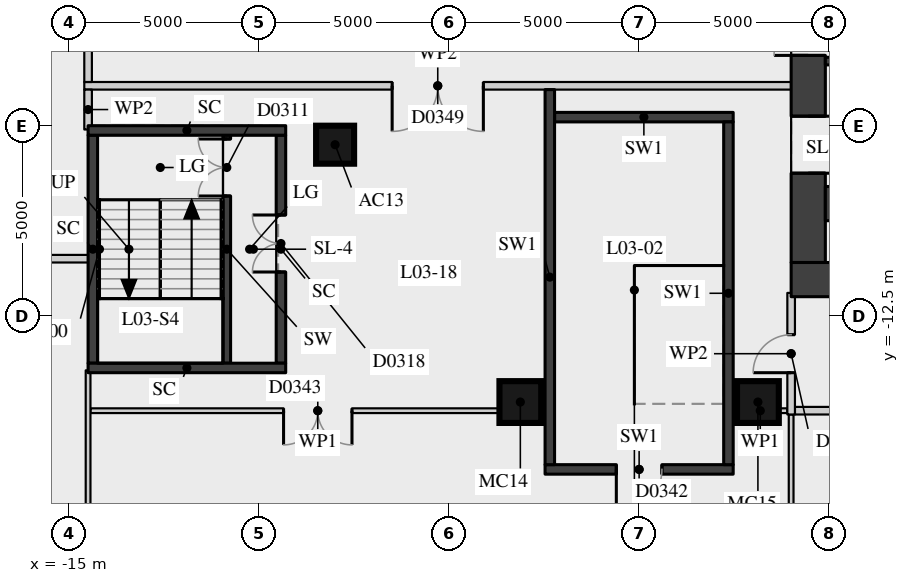
"""IFC4 building model, lengths in metres.
Left out: names, types, materials, properties, quantities, classifications, styles, units other than length and angle.
Written with IfcOpenShell. Run it as: python <this file> out.ifc"""

import sys

from ifc_helpers import new_model, si_unit, direction, frame, frame_2d, origin, origin_2d, place, context, subcontext, project, spatial, rectangle, extrude, element, fill, save


model = new_model("IFC4")
c1 = context("Model", 3, precision=1e-05, world=origin(), true_north=direction((0.0, 1.0)))
c2 = subcontext(c1, "Body", "Model", "MODEL_VIEW")
j1 = project(units=[si_unit("LENGTHUNIT", "METRE"), si_unit("PLANEANGLEUNIT", "RADIAN")], contexts=[c1])
p1 = place(None, origin())
s1 = spatial("IfcSite", under=j1, at=p1, CompositionType="ELEMENT")
p2 = place(p1, origin())
s2 = spatial("IfcBuilding", under=s1, at=p2, CompositionType="ELEMENT")
p3 = place(p2, frame((0.0, 0.0, 17.5)))
s3 = spatial("IfcBuildingStorey", under=s2, at=p3, CompositionType="ELEMENT", Elevation=17.5)
p4 = place(p3, frame((-8.0, -8.0, 0.0), z_axis=(0.0, 0.0, 1.0), x_axis=(1.0, 0.0, 0.0)))
e1 = element("IfcColumn", 1, at=p4, inside=s3, PredefinedType="COLUMN", context=c2, shape_type="SweptSolid", body=[
    extrude(rectangle(XDim=1.0, YDim=1.0, at=origin_2d()), origin(), (0.0, 0.0, 1.0), 4.2),
])
for number, where, z_axis, x_axis in (
    (2, (-3.126, -14.772, 0.0), (0.0, 0.0, 1.0), (1.0, 0.0, 0.0)),
    (3, (3.126, -14.772, 0.0), (0.0, 0.0, 1.0), (1.0, 0.0, 0.0)),
):
    element("IfcColumn", number, at=place(p3, frame(where, z_axis=z_axis, x_axis=x_axis)), inside=s3, PredefinedType="COLUMN", context=c2, shape_type="SweptSolid", body=[
        extrude(rectangle(XDim=1.1, YDim=1.1, at=origin_2d()), origin(), (0.0, 0.0, 1.0), 4.2),
    ])
p5 = place(p3, frame((4.45, -11.1, 0.0), z_axis=(0.0, 0.0, 1.0), x_axis=(0.0, 1.0, 0.0)))
e4 = element("IfcWall", 4, at=p5, inside=s3, PredefinedType="SHEAR", context=c2, shape_type="SweptSolid", body=[
    extrude(rectangle(XDim=22.2, YDim=0.9, at=frame_2d((11.1, 0.0))), origin(), (0.0, 0.0, 1.0), 3.92),
])
p6 = place(p5, frame((2.35, 0.0, 0.0)))
e5 = element("IfcOpeningElement", 5, at=p6, cuts=e4, PredefinedType="OPENING", context=c2, shape_type="SweptSolid", body=[
    extrude(rectangle(XDim=1.5, YDim=2.1, at=frame_2d((0.75, 1.05))), frame((0.0, 0.46, 0.0), z_axis=(0.0, -1.0, 0.0), x_axis=(1.0, 0.0, 0.0)), (0.0, 0.0, 1.0), 0.92),
])
p7 = place(p5, frame((5.45, 0.0, 0.0)))
e6 = element("IfcOpeningElement", 6, at=p7, cuts=e4, PredefinedType="OPENING", context=c2, shape_type="SweptSolid", body=[
    extrude(rectangle(XDim=1.8, YDim=2.1, at=frame_2d((0.9, 1.05))), frame((0.0, 0.46, 0.0), z_axis=(0.0, -1.0, 0.0), x_axis=(1.0, 0.0, 0.0)), (0.0, 0.0, 1.0), 0.92),
])
p8 = place(p5, frame((7.95, 0.0, 0.0)))
e7 = element("IfcOpeningElement", 7, at=p8, cuts=e4, PredefinedType="OPENING", context=c2, shape_type="SweptSolid", body=[
    extrude(rectangle(XDim=1.1, YDim=2.1, at=frame_2d((0.55, 1.05))), frame((0.0, 0.46, 0.0), z_axis=(0.0, -1.0, 0.0), x_axis=(1.0, 0.0, 0.0)), (0.0, 0.0, 1.0), 0.92),
])
p9 = place(p5, frame((10.6, 0.0, 0.0)))
e8 = element("IfcOpeningElement", 8, at=p9, cuts=e4, PredefinedType="OPENING", context=c2, shape_type="SweptSolid", body=[
    extrude(rectangle(XDim=1.0, YDim=2.1, at=frame_2d((0.5, 1.05))), frame((0.0, 0.46, 0.0), z_axis=(0.0, -1.0, 0.0), x_axis=(1.0, 0.0, 0.0)), (0.0, 0.0, 1.0), 0.92),
])
p10 = place(p5, frame((13.15, 0.0, 0.0)))
e9 = element("IfcOpeningElement", 9, at=p10, cuts=e4, PredefinedType="OPENING", context=c2, shape_type="SweptSolid", body=[
    extrude(rectangle(XDim=1.1, YDim=2.1, at=frame_2d((0.55, 1.05))), frame((0.0, 0.46, 0.0), z_axis=(0.0, -1.0, 0.0), x_axis=(1.0, 0.0, 0.0)), (0.0, 0.0, 1.0), 0.92),
])
p11 = place(p5, frame((14.95, 0.0, 0.0)))
e10 = element("IfcOpeningElement", 10, at=p11, cuts=e4, PredefinedType="OPENING", context=c2, shape_type="SweptSolid", body=[
    extrude(rectangle(XDim=1.8, YDim=2.1, at=frame_2d((0.9, 1.05))), frame((0.0, 0.46, 0.0), z_axis=(0.0, -1.0, 0.0), x_axis=(1.0, 0.0, 0.0)), (0.0, 0.0, 1.0), 0.92),
])
p12 = place(p5, frame((18.35, 0.0, 0.0)))
e11 = element("IfcOpeningElement", 11, at=p12, cuts=e4, PredefinedType="OPENING", context=c2, shape_type="SweptSolid", body=[
    extrude(rectangle(XDim=1.5, YDim=2.1, at=frame_2d((0.75, 1.05))), frame((0.0, 0.46, 0.0), z_axis=(0.0, -1.0, 0.0), x_axis=(1.0, 0.0, 0.0)), (0.0, 0.0, 1.0), 0.92),
])
p13 = place(p3, frame((4.0, -11.55, 0.0), z_axis=(0.0, 0.0, 1.0), x_axis=(1.0, 0.0, 0.0)))
e12 = element("IfcWall", 12, at=p13, inside=s3, PredefinedType="SHEAR", context=c2, shape_type="SweptSolid", body=[
    extrude(rectangle(XDim=15.2, YDim=0.9, at=frame_2d((7.6, 0.0))), origin(), (0.0, 0.0, 1.0), 3.92),
])
p14 = place(p3, frame((4.9, -9.55, 0.0), z_axis=(0.0, 0.0, 1.0), x_axis=(1.0, 0.0, 0.0)))
e13 = element("IfcWall", 13, at=p14, inside=s3, PredefinedType="SHEAR", context=c2, shape_type="SweptSolid", body=[
    extrude(rectangle(XDim=10.2, YDim=0.9, at=frame_2d((5.1, 0.0))), origin(), (0.0, 0.0, 1.0), 3.92),
])
p15 = place(p3, frame((4.9, -5.8, 0.0), z_axis=(0.0, 0.0, 1.0), x_axis=(1.0, 0.0, 0.0)))
e14 = element("IfcWall", 14, at=p15, inside=s3, PredefinedType="SHEAR", context=c2, shape_type="SweptSolid", body=[
    extrude(rectangle(XDim=10.2, YDim=0.2, at=frame_2d((5.1, 0.0))), origin(), (0.0, 0.0, 1.0), 3.92),
])
p16 = place(p3, frame((-10.85, -13.75, 0.0), z_axis=(0.0, 0.0, 1.0), x_axis=(0.0, 1.0, 0.0)))
e15 = element("IfcWall", 15, at=p16, inside=s3, PredefinedType="SHEAR", context=c2, shape_type="SweptSolid", body=[
    extrude(rectangle(XDim=6.0, YDim=0.2, at=frame_2d((3.0, 0.0))), origin(), (0.0, 0.0, 1.0), 3.92),
])
p17 = place(p16, frame((4.4, 0.0, 0.0)))
e16 = element("IfcOpeningElement", 16, at=p17, cuts=e15, PredefinedType="OPENING", context=c2, shape_type="SweptSolid", body=[
    extrude(rectangle(XDim=1.5, YDim=2.1, at=frame_2d((0.75, 1.05))), frame((0.0, 0.11, 0.0), z_axis=(0.0, -1.0, 0.0), x_axis=(1.0, 0.0, 0.0)), (0.0, 0.0, 1.0), 0.22),
])
p18 = place(p3, frame((-14.375, -13.75, -0.35), z_axis=(0.0, 0.0, 1.0), x_axis=(0.0, 1.0, 0.0)))
e17 = element("IfcWall", 17, at=p18, inside=s3, PredefinedType="SHEAR", context=c2, shape_type="SweptSolid", body=[
    extrude(rectangle(XDim=6.0, YDim=0.25, at=frame_2d((3.0, 0.0))), origin(), (0.0, 0.0, 1.0), 4.27),
])
p19 = place(p3, frame((-9.425, -13.75, -0.35), z_axis=(0.0, 0.0, 1.0), x_axis=(0.0, 1.0, 0.0)))
e18 = element("IfcWall", 18, at=p19, inside=s3, PredefinedType="SHEAR", context=c2, shape_type="SweptSolid", body=[
    extrude(rectangle(XDim=6.0, YDim=0.25, at=frame_2d((3.0, 0.0))), origin(), (0.0, 0.0, 1.0), 4.27),
])
p20 = place(p19, frame((2.4, 0.0, 0.35)))
e19 = element("IfcOpeningElement", 19, at=p20, cuts=e18, PredefinedType="OPENING", context=c2, shape_type="SweptSolid", body=[
    extrude(rectangle(XDim=1.5, YDim=2.1, at=frame_2d((0.75, 1.05))), frame((0.0, 0.135, 0.0), z_axis=(0.0, -1.0, 0.0), x_axis=(1.0, 0.0, 0.0)), (0.0, 0.0, 1.0), 0.27),
])
for number, where, z_axis, x_axis in (
    (20, (-14.5, -7.625, -0.35), (0.0, 0.0, 1.0), (1.0, 0.0, 0.0)),
    (21, (-14.5, -13.875, -0.35), (0.0, 0.0, 1.0), (1.0, 0.0, 0.0)),
):
    element("IfcWall", number, at=place(p3, frame(where, z_axis=z_axis, x_axis=x_axis)), inside=s3, PredefinedType="SHEAR", context=c2, shape_type="SweptSolid", body=[
        extrude(rectangle(XDim=5.2, YDim=0.25, at=frame_2d((2.6, 0.0))), origin(), (0.0, 0.0, 1.0), 4.27),
    ])
p21 = place(p3, frame((-2.475, -16.545, 0.0), z_axis=(0.0, 0.0, 1.0), x_axis=(1.0, 0.0, 0.0)))
e22 = element("IfcWall", 22, at=p21, inside=s3, PredefinedType="SOLIDWALL", context=c2, shape_type="SweptSolid", body=[
    extrude(rectangle(XDim=4.95, YDim=0.25, at=frame_2d((2.475, 0.0))), origin(), (0.0, 0.0, 1.0), 3.92),
])
p22 = place(p21, frame((1.875, 0.0, 0.0)))
e23 = element("IfcOpeningElement", 23, at=p22, cuts=e22, PredefinedType="OPENING", context=c2, shape_type="SweptSolid", body=[
    extrude(rectangle(XDim=1.2, YDim=2.1, at=frame_2d((0.6, 1.05))), frame((0.0, 0.135, 0.0), z_axis=(0.0, -1.0, 0.0), x_axis=(1.0, 0.0, 0.0)), (0.0, 0.0, 1.0), 0.27),
])
p23 = place(p3, frame((-14.438, -15.0, 0.0), z_axis=(0.0, 0.0, 1.0), x_axis=(1.0, 0.0, 0.0)))
e24 = element("IfcWall", 24, at=p23, inside=s3, PredefinedType="PARTITIONING", context=c2, shape_type="SweptSolid", body=[
    extrude(rectangle(XDim=11.962, YDim=0.125, at=frame_2d((5.981, 0.0))), origin(), (0.0, 0.0, 1.0), 3.92),
])
p24 = place(p23, frame((5.082, 0.0, 0.0)))
e25 = element("IfcOpeningElement", 25, at=p24, cuts=e24, PredefinedType="OPENING", context=c2, shape_type="SweptSolid", body=[
    extrude(rectangle(XDim=1.8, YDim=2.1, at=frame_2d((0.9, 1.05))), frame((0.0, 0.073, 0.0), z_axis=(0.0, -1.0, 0.0), x_axis=(1.0, 0.0, 0.0)), (0.0, 0.0, 1.0), 0.145),
])
p25 = place(p3, frame((2.475, -15.0, 0.0), z_axis=(0.0, 0.0, 1.0), x_axis=(1.0, 0.0, 0.0)))
e26 = element("IfcWall", 26, at=p25, inside=s3, PredefinedType="PARTITIONING", context=c2, shape_type="SweptSolid", body=[
    extrude(rectangle(XDim=1.425, YDim=0.125, at=frame_2d((0.712, 0.0))), origin(), (0.0, 0.0, 1.0), 3.92),
])
p26 = place(p3, frame((4.1, -15.0, 0.0), z_axis=(0.0, 0.0, 1.0), x_axis=(1.0, 0.0, 0.0)))
e27 = element("IfcWall", 27, at=p26, inside=s3, PredefinedType="PARTITIONING", context=c2, shape_type="SweptSolid", body=[
    extrude(rectangle(XDim=18.962, YDim=0.2, at=frame_2d((9.481, 0.0))), origin(), (0.0, 0.0, 1.0), 3.92),
])
p27 = place(p26, frame((3.5, 0.0, 0.0)))
e28 = element("IfcOpeningElement", 28, at=p27, cuts=e27, PredefinedType="OPENING", context=c2, shape_type="SweptSolid", body=[
    extrude(rectangle(XDim=1.0, YDim=2.1, at=frame_2d((0.5, 1.05))), frame((0.0, 0.11, 0.0), z_axis=(0.0, -1.0, 0.0), x_axis=(1.0, 0.0, 0.0)), (0.0, 0.0, 1.0), 0.22),
])
p28 = place(p26, frame((10.0, 0.0, 0.0)))
e29 = element("IfcOpeningElement", 29, at=p28, cuts=e27, PredefinedType="OPENING", context=c2, shape_type="SweptSolid", body=[
    extrude(rectangle(XDim=1.0, YDim=2.1, at=frame_2d((0.5, 1.05))), frame((0.0, 0.11, 0.0), z_axis=(0.0, -1.0, 0.0), x_axis=(1.0, 0.0, 0.0)), (0.0, 0.0, 1.0), 0.22),
])
p29 = place(p3, frame((-25.702, -11.0, 0.0), z_axis=(0.0, 0.0, 1.0), x_axis=(1.0, 0.0, 0.0)))
e30 = element("IfcWall", 30, at=p29, inside=s3, PredefinedType="PARTITIONING", context=c2, shape_type="SweptSolid", body=[
    extrude(rectangle(XDim=11.204, YDim=0.2, at=frame_2d((5.602, 0.0))), origin(), (0.0, 0.0, 1.0), 3.92),
])
p30 = place(p29, frame((5.102, 0.0, 0.0)))
e31 = element("IfcOpeningElement", 31, at=p30, cuts=e30, PredefinedType="OPENING", context=c2, shape_type="SweptSolid", body=[
    extrude(rectangle(XDim=1.0, YDim=2.1, at=frame_2d((0.5, 1.05))), frame((0.0, 0.11, 0.0), z_axis=(0.0, -1.0, 0.0), x_axis=(1.0, 0.0, 0.0)), (0.0, 0.0, 1.0), 0.22),
])
p31 = place(p3, frame((-2.225, -7.275, 0.0), z_axis=(0.0, 0.0, 1.0), x_axis=(1.0, 0.0, 0.0)))
e32 = element("IfcWall", 32, at=p31, inside=s3, PredefinedType="SOLIDWALL", context=c2, shape_type="SweptSolid", body=[
    extrude(rectangle(XDim=4.7, YDim=0.25, at=frame_2d((2.35, 0.0))), origin(), (0.0, 0.0, 1.0), 3.92),
])
p32 = place(p3, frame((-14.6, -6.45, 0.0), z_axis=(0.0, 0.0, 1.0), x_axis=(1.0, 0.0, 0.0)))
e33 = element("IfcWall", 33, at=p32, inside=s3, PredefinedType="PARTITIONING", context=c2, shape_type="SweptSolid", body=[
    extrude(rectangle(XDim=18.602, YDim=0.2, at=frame_2d((9.301, 0.0))), origin(), (0.0, 0.0, 1.0), 3.92),
])
p33 = place(p32, frame((8.101, 0.0, 0.0)))
e34 = element("IfcOpeningElement", 34, at=p33, cuts=e33, PredefinedType="OPENING", context=c2, shape_type="SweptSolid", body=[
    extrude(rectangle(XDim=2.4, YDim=2.4, at=frame_2d((1.2, 1.2))), frame((0.0, 0.11, 0.0), z_axis=(0.0, -1.0, 0.0), x_axis=(1.0, 0.0, 0.0)), (0.0, 0.0, 1.0), 0.22),
])
p34 = place(p3, frame((-14.5, -22.027, 0.0), z_axis=(0.0, 0.0, 1.0), x_axis=(0.0, 1.0, 0.0)))
e35 = element("IfcWall", 35, at=p34, inside=s3, PredefinedType="PARTITIONING", context=c2, shape_type="SweptSolid", body=[
    extrude(rectangle(XDim=8.089, YDim=0.125, at=frame_2d((4.045, 0.0))), origin(), (0.0, 0.0, 1.0), 3.47),
])
p35 = place(p34, frame((3.045, 0.0, 0.0)))
e36 = element("IfcOpeningElement", 36, at=p35, cuts=e35, PredefinedType="OPENING", context=c2, shape_type="SweptSolid", body=[
    extrude(rectangle(XDim=1.0, YDim=2.1, at=frame_2d((0.5, 1.05))), frame((0.0, 0.073, 0.0), z_axis=(0.0, -1.0, 0.0), x_axis=(1.0, 0.0, 0.0)), (0.0, 0.0, 1.0), 0.145),
])
p36 = place(p3, frame((-14.5, -7.6, 0.0), z_axis=(0.0, 0.0, 1.0), x_axis=(0.0, 1.0, 0.0)))
e37 = element("IfcWall", 37, at=p36, inside=s3, PredefinedType="PARTITIONING", context=c2, shape_type="SweptSolid", body=[
    extrude(rectangle(XDim=1.05, YDim=0.2, at=frame_2d((0.525, 0.0))), origin(), (0.0, 0.0, 1.0), 3.92),
])
p37 = place(p3, frame((-14.5, -6.35, 0.0), z_axis=(0.0, 0.0, 1.0), x_axis=(0.0, 1.0, 0.0)))
e38 = element("IfcWall", 38, at=p37, inside=s3, PredefinedType="PARTITIONING", context=c2, shape_type="SweptSolid", body=[
    extrude(rectangle(XDim=13.95, YDim=0.2, at=frame_2d((6.975, 0.0))), origin(), (0.0, 0.0, 1.0), 3.92),
])
p38 = place(p37, frame((10.025, 0.0, 0.0)))
e39 = element("IfcOpeningElement", 39, at=p38, cuts=e38, PredefinedType="OPENING", context=c2, shape_type="SweptSolid", body=[
    extrude(rectangle(XDim=2.4, YDim=2.4, at=frame_2d((1.2, 1.2))), frame((0.0, 0.11, 0.0), z_axis=(0.0, -1.0, 0.0), x_axis=(1.0, 0.0, 0.0)), (0.0, 0.0, 1.0), 0.22),
])
p39 = place(p3, frame((-2.35, -16.42, 0.0), z_axis=(0.0, 0.0, 1.0), x_axis=(0.0, 1.0, 0.0)))
e40 = element("IfcWall", 40, at=p39, inside=s3, PredefinedType="SOLIDWALL", context=c2, shape_type="SweptSolid", body=[
    extrude(rectangle(XDim=9.87, YDim=0.25, at=frame_2d((4.935, 0.0))), origin(), (0.0, 0.0, 1.0), 3.92),
])
p40 = place(p3, frame((2.35, -16.42, 0.0), z_axis=(0.0, 0.0, 1.0), x_axis=(0.0, 1.0, 0.0)))
e41 = element("IfcWall", 41, at=p40, inside=s3, PredefinedType="SOLIDWALL", context=c2, shape_type="SweptSolid", body=[
    extrude(rectangle(XDim=9.02, YDim=0.25, at=frame_2d((4.51, 0.0))), origin(), (0.0, 0.0, 1.0), 3.92),
])
p41 = place(p3, frame((4.0, -25.242, 0.0), z_axis=(0.0, 0.0, 1.0), x_axis=(0.0, 1.0, 0.0)))
e42 = element("IfcWall", 42, at=p41, inside=s3, PredefinedType="PARTITIONING", context=c2, shape_type="SweptSolid", body=[
    extrude(rectangle(XDim=10.142, YDim=0.125, at=frame_2d((5.071, 0.0))), origin(), (0.0, 0.0, 1.0), 3.92),
])
p42 = place(p3, frame((4.0, -15.1, 0.0), z_axis=(0.0, 0.0, 1.0), x_axis=(0.0, 1.0, 0.0)))
e43 = element("IfcWall", 43, at=p42, inside=s3, PredefinedType="PARTITIONING", context=c2, shape_type="SweptSolid", body=[
    extrude(rectangle(XDim=3.2, YDim=0.2, at=frame_2d((1.6, 0.0))), origin(), (0.0, 0.0, 1.0), 3.92),
])
p43 = place(p42, frame((1.1, 0.0, 0.0)))
e44 = element("IfcOpeningElement", 44, at=p43, cuts=e43, PredefinedType="OPENING", context=c2, shape_type="SweptSolid", body=[
    extrude(rectangle(XDim=1.0, YDim=2.1, at=frame_2d((0.5, 1.05))), frame((0.0, 0.11, 0.0), z_axis=(0.0, -1.0, 0.0), x_axis=(1.0, 0.0, 0.0)), (0.0, 0.0, 1.0), 0.22),
])
p44 = place(p6, origin())
e45 = element("IfcDoor", 45, at=p44, inside=s3, OperationType="DOUBLE_DOOR_SINGLE_SWING", PredefinedType="DOOR", context=c2, shape_type="SweptSolid", body=[
    extrude(rectangle(XDim=1.5, YDim=2.1, at=frame_2d((0.75, 1.05))), frame((0.0, 0.025, 0.0), z_axis=(0.0, -1.0, 0.0), x_axis=(1.0, 0.0, 0.0)), (0.0, 0.0, 1.0), 0.05),
])
fill(e5, e45)
p45 = place(p7, origin())
e46 = element("IfcDoor", 46, at=p45, inside=s3, OperationType="DOUBLE_DOOR_SINGLE_SWING", PredefinedType="DOOR", context=c2, shape_type="SweptSolid", body=[
    extrude(rectangle(XDim=1.8, YDim=2.1, at=frame_2d((0.9, 1.05))), frame((0.0, 0.025, 0.0), z_axis=(0.0, -1.0, 0.0), x_axis=(1.0, 0.0, 0.0)), (0.0, 0.0, 1.0), 0.05),
])
fill(e6, e46)
p46 = place(p17, origin())
e47 = element("IfcDoor", 47, at=p46, inside=s3, OperationType="DOUBLE_DOOR_SINGLE_SWING", PredefinedType="DOOR", context=c2, shape_type="SweptSolid", body=[
    extrude(rectangle(XDim=1.5, YDim=2.1, at=frame_2d((0.75, 1.05))), frame((0.0, 0.025, 0.0), z_axis=(0.0, -1.0, 0.0), x_axis=(1.0, 0.0, 0.0)), (0.0, 0.0, 1.0), 0.05),
])
fill(e16, e47)
p47 = place(p20, origin())
e48 = element("IfcDoor", 48, at=p47, inside=s3, OperationType="DOUBLE_DOOR_SINGLE_SWING", PredefinedType="DOOR", context=c2, shape_type="SweptSolid", body=[
    extrude(rectangle(XDim=1.5, YDim=2.1, at=frame_2d((0.75, 1.05))), frame((0.0, 0.025, 0.0), z_axis=(0.0, -1.0, 0.0), x_axis=(1.0, 0.0, 0.0)), (0.0, 0.0, 1.0), 0.05),
])
fill(e19, e48)
p48 = place(p33, origin())
e49 = element("IfcDoor", 49, at=p48, inside=s3, OperationType="DOUBLE_DOOR_SINGLE_SWING", PredefinedType="DOOR", context=c2, shape_type="SweptSolid", body=[
    extrude(rectangle(XDim=2.4, YDim=2.4, at=frame_2d((1.2, 1.2))), frame((0.0, 0.025, 0.0), z_axis=(0.0, -1.0, 0.0), x_axis=(1.0, 0.0, 0.0)), (0.0, 0.0, 1.0), 0.05),
])
fill(e34, e49)
p49 = place(p24, origin())
e50 = element("IfcDoor", 50, at=p49, inside=s3, OperationType="DOUBLE_DOOR_SINGLE_SWING", PredefinedType="DOOR", context=c2, shape_type="SweptSolid", body=[
    extrude(rectangle(XDim=1.8, YDim=2.1, at=frame_2d((0.9, 1.05))), frame((0.0, 0.025, 0.0), z_axis=(0.0, -1.0, 0.0), x_axis=(1.0, 0.0, 0.0)), (0.0, 0.0, 1.0), 0.05),
])
fill(e25, e50)
p50 = place(p43, origin())
e51 = element("IfcDoor", 51, at=p50, inside=s3, OperationType="SINGLE_SWING_LEFT", PredefinedType="DOOR", context=c2, shape_type="SweptSolid", body=[
    extrude(rectangle(XDim=1.0, YDim=2.1, at=frame_2d((0.5, 1.05))), frame((0.0, 0.025, 0.0), z_axis=(0.0, -1.0, 0.0), x_axis=(1.0, 0.0, 0.0)), (0.0, 0.0, 1.0), 0.05),
])
fill(e44, e51)
p51 = place(p22, origin())
e52 = element("IfcDoor", 52, at=p51, inside=s3, OperationType="SINGLE_SWING_RIGHT", PredefinedType="DOOR", context=c2, shape_type="SweptSolid", body=[
    extrude(rectangle(XDim=1.2, YDim=2.1, at=frame_2d((0.6, 1.05))), frame((0.0, 0.025, 0.0), z_axis=(0.0, -1.0, 0.0), x_axis=(1.0, 0.0, 0.0)), (0.0, 0.0, 1.0), 0.05),
])
fill(e23, e52)
save(model, sys.argv[1])
